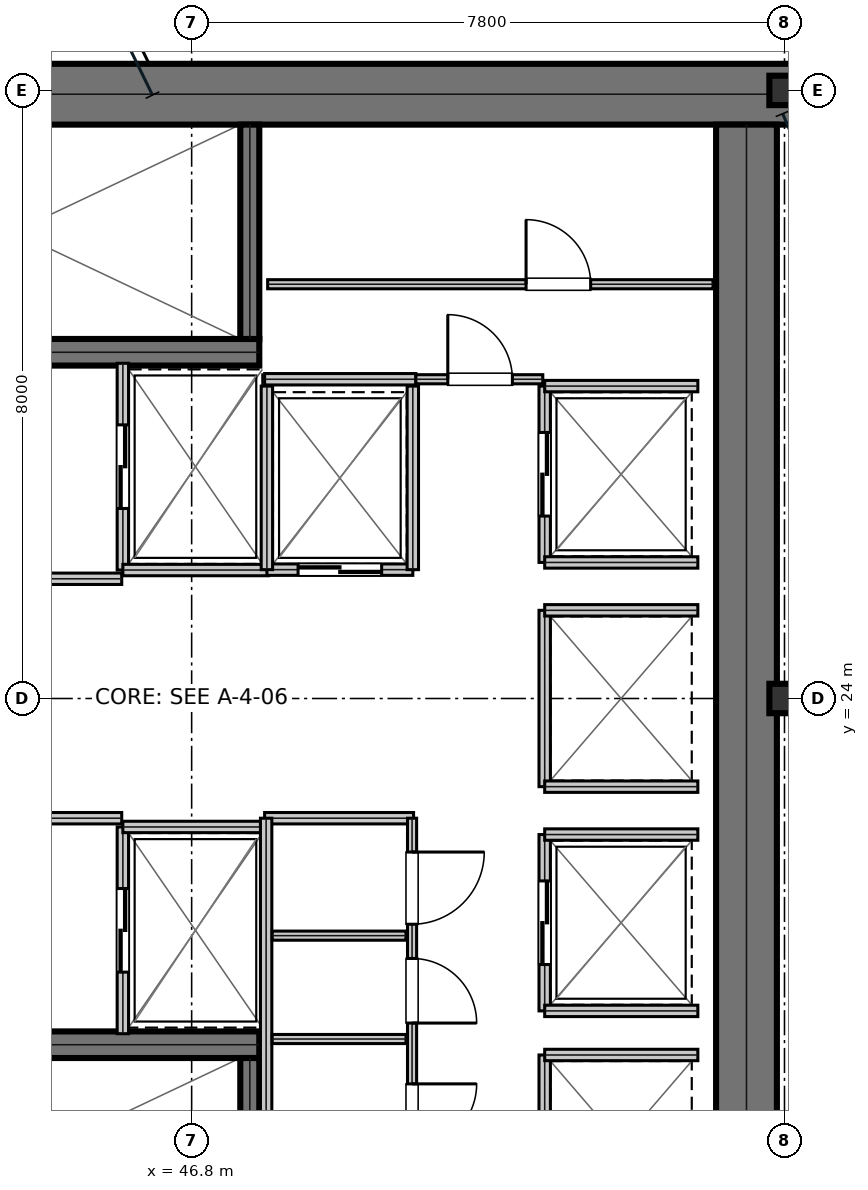
"""IFC4 building model, lengths in metres.
Left out: names, types, materials, properties, quantities, classifications, styles, units other than length and angle.
Written with IfcOpenShell. Run it as: python <this file> out.ifc"""

import sys

from ifc_helpers import new_model, si_unit, direction, frame, frame_2d, origin, origin_2d, place, context, subcontext, project, spatial, rectangle, i_section, extrude, element, fill, save


model = new_model("IFC4")
c1 = context("Model", 3, precision=1e-05, world=origin(), true_north=direction((0.0, 1.0)))
c2 = subcontext(c1, "Body", "Model", "MODEL_VIEW")
j1 = project(units=[si_unit("LENGTHUNIT", "METRE"), si_unit("PLANEANGLEUNIT", "RADIAN")], contexts=[c1])
p1 = place(None, origin())
s1 = spatial("IfcSite", under=j1, at=p1, CompositionType="ELEMENT")
p2 = place(p1, origin())
s2 = spatial("IfcBuilding", under=s1, at=p2, CompositionType="ELEMENT")
p3 = place(p2, frame((0.0, 0.0, 116.85)))
s3 = spatial("IfcBuildingStorey", under=s2, at=p3, CompositionType="ELEMENT", Elevation=116.85)
p4 = place(p3, frame((38.8, 31.95, 0.0), z_axis=(0.0, 0.0, 1.0), x_axis=(1.0, 0.0, 0.0)))
e1 = element("IfcWall", 1, at=p4, inside=s3, PredefinedType="SHEAR", context=c2, shape_type="SweptSolid", body=[
    extrude(rectangle(XDim=16.0, YDim=0.8, at=frame_2d((8.0, 0.0))), origin(), (0.0, 0.0, 1.0), 3.81),
])
p5 = place(p3, frame((54.1, 16.45, 0.0), z_axis=(0.0, 0.0, 1.0), x_axis=(0.0, 1.0, 0.0)))
e2 = element("IfcWall", 2, at=p5, inside=s3, PredefinedType="SHEAR", context=c2, shape_type="SweptSolid", body=[
    extrude(rectangle(XDim=15.1, YDim=0.8, at=frame_2d((7.55, 0.0))), origin(), (0.0, 0.0, 1.0), 3.81),
])
p6 = place(p3, frame((39.98, 28.555, 0.0), z_axis=(0.0, 0.0, 1.0), x_axis=(1.0, 0.0, 0.0)))
e3 = element("IfcWall", 3, at=p6, inside=s3, PredefinedType="SHEAR", context=c2, shape_type="SweptSolid", body=[
    extrude(rectangle(XDim=7.71, YDim=0.35, at=frame_2d((3.855, 0.0))), origin(), (0.0, 0.0, 1.0), 3.81),
])
p7 = place(p6, frame((0.25, 0.0, 0.0)))
e4 = element("IfcOpeningElement", 4, at=p7, cuts=e3, PredefinedType="OPENING", context=c2, shape_type="SweptSolid", body=[
    extrude(rectangle(XDim=1.1, YDim=2.15, at=frame_2d((0.55, 1.075))), frame((0.0, 0.185, 0.0), z_axis=(0.0, -1.0, 0.0), x_axis=(1.0, 0.0, 0.0)), (0.0, 0.0, 1.0), 0.37),
])
p8 = place(p3, frame((39.98, 19.445, 0.0), z_axis=(0.0, 0.0, 1.0), x_axis=(1.0, 0.0, 0.0)))
e5 = element("IfcWall", 5, at=p8, inside=s3, PredefinedType="SHEAR", context=c2, shape_type="SweptSolid", body=[
    extrude(rectangle(XDim=7.71, YDim=0.35, at=frame_2d((3.855, 0.0))), origin(), (0.0, 0.0, 1.0), 3.81),
])
p9 = place(p8, frame((0.25, 0.0, 0.0)))
e6 = element("IfcOpeningElement", 6, at=p9, cuts=e5, PredefinedType="OPENING", context=c2, shape_type="SweptSolid", body=[
    extrude(rectangle(XDim=1.1, YDim=2.15, at=frame_2d((0.55, 1.075))), frame((0.0, 0.185, 0.0), z_axis=(0.0, -1.0, 0.0), x_axis=(1.0, 0.0, 0.0)), (0.0, 0.0, 1.0), 0.37),
])
for number, where, z_axis, x_axis in (
    (7, (47.565, 28.73, 0.0), (0.0, 0.0, 1.0), (0.0, 1.0, 0.0)),
    (8, (47.565, 16.45, 0.0), (0.0, 0.0, 1.0), (0.0, 1.0, 0.0)),
):
    element("IfcWall", number, at=place(p3, frame(where, z_axis=z_axis, x_axis=x_axis)), inside=s3, PredefinedType="SHEAR", context=c2, shape_type="SweptSolid", body=[
        extrude(rectangle(XDim=2.82, YDim=0.25, at=frame_2d((1.41, 0.0))), origin(), (0.0, 0.0, 1.0), 3.81),
    ])
for number, where, z_axis, x_axis in (
    (9, (54.6, 24.0, 0.0), (0.0, 0.0, 1.0), (1.0, 0.0, 0.0)),
    (10, (54.6, 32.0, 0.0), (0.0, 0.0, 1.0), (1.0, 0.0, 0.0)),
):
    element("IfcColumn", number, at=place(p3, frame(where, z_axis=z_axis, x_axis=x_axis)), inside=s3, PredefinedType="COLUMN", context=c2, shape_type="SweptSolid", body=[
        extrude(i_section(OverallWidth=0.398, OverallDepth=0.387, WebThickness=0.021, FlangeThickness=0.033, at=origin_2d()), origin(), (0.0, 0.0, 1.0), 4.044),
    ])
p10 = place(p3, frame((39.98, 25.575, 0.0), z_axis=(0.0, 0.0, 1.0), x_axis=(1.0, 0.0, 0.0)))
e11 = element("IfcWall", 11, at=p10, inside=s3, PredefinedType="PARTITIONING", context=c2, shape_type="SweptSolid", body=[
    extrude(rectangle(XDim=5.9, YDim=0.15, at=frame_2d((2.95, 0.0))), origin(), (0.0, 0.0, 1.0), 3.81),
])
p11 = place(p10, frame((2.35, 0.0, 0.0)))
e12 = element("IfcOpeningElement", 12, at=p11, cuts=e11, PredefinedType="OPENING", context=c2, shape_type="SweptSolid", body=[
    extrude(rectangle(XDim=1.05, YDim=2.15, at=frame_2d((0.525, 1.075))), frame((0.0, 0.085, 0.0), z_axis=(0.0, -1.0, 0.0), x_axis=(1.0, 0.0, 0.0)), (0.0, 0.0, 1.0), 0.17),
])
p12 = place(p3, frame((39.98, 22.425, 0.0), z_axis=(0.0, 0.0, 1.0), x_axis=(1.0, 0.0, 0.0)))
e13 = element("IfcWall", 13, at=p12, inside=s3, PredefinedType="PARTITIONING", context=c2, shape_type="SweptSolid", body=[
    extrude(rectangle(XDim=5.9, YDim=0.15, at=frame_2d((2.95, 0.0))), origin(), (0.0, 0.0, 1.0), 3.81),
])
p13 = place(p12, frame((2.35, 0.0, 0.0)))
e14 = element("IfcOpeningElement", 14, at=p13, cuts=e13, PredefinedType="OPENING", context=c2, shape_type="SweptSolid", body=[
    extrude(rectangle(XDim=1.05, YDim=2.15, at=frame_2d((0.525, 1.075))), frame((0.0, 0.085, 0.0), z_axis=(0.0, -1.0, 0.0), x_axis=(1.0, 0.0, 0.0)), (0.0, 0.0, 1.0), 0.17),
])
p14 = place(p3, frame((45.895, 25.69, 0.0), z_axis=(0.0, 0.0, 1.0), x_axis=(0.0, 1.0, 0.0)))
e15 = element("IfcWall", 15, at=p14, inside=s3, PredefinedType="PARTITIONING", context=c2, shape_type="SweptSolid", body=[
    extrude(rectangle(XDim=2.72, YDim=0.15, at=frame_2d((1.36, 0.0))), origin(), (0.0, 0.0, 1.0), 3.81),
])
p15 = place(p14, frame((0.81, 0.0, 0.0)))
e16 = element("IfcOpeningElement", 16, at=p15, cuts=e15, PredefinedType="OPENING", context=c2, shape_type="SweptSolid", body=[
    extrude(rectangle(XDim=1.1, YDim=2.15, at=frame_2d((0.55, 1.075))), frame((0.0, 0.085, 0.0), z_axis=(0.0, -1.0, 0.0), x_axis=(1.0, 0.0, 0.0)), (0.0, 0.0, 1.0), 0.17),
])
p16 = place(p3, frame((45.895, 25.69, 0.0), z_axis=(0.0, 0.0, 1.0), x_axis=(1.0, 0.0, 0.0)))
e17 = element("IfcWall", 17, at=p16, inside=s3, PredefinedType="PARTITIONING", context=c2, shape_type="SweptSolid", body=[
    extrude(rectangle(XDim=1.915, YDim=0.15, at=frame_2d((0.958, 0.0))), origin(), (0.0, 0.0, 1.0), 3.81),
])
p17 = place(p3, frame((45.895, 19.59, 0.0), z_axis=(0.0, 0.0, 1.0), x_axis=(0.0, 1.0, 0.0)))
e18 = element("IfcWall", 18, at=p17, inside=s3, PredefinedType="PARTITIONING", context=c2, shape_type="SweptSolid", body=[
    extrude(rectangle(XDim=2.72, YDim=0.15, at=frame_2d((1.36, 0.0))), origin(), (0.0, 0.0, 1.0), 3.81),
])
p18 = place(p17, frame((0.81, 0.0, 0.0)))
e19 = element("IfcOpeningElement", 19, at=p18, cuts=e18, PredefinedType="OPENING", context=c2, shape_type="SweptSolid", body=[
    extrude(rectangle(XDim=1.1, YDim=2.15, at=frame_2d((0.55, 1.075))), frame((0.0, 0.085, 0.0), z_axis=(0.0, -1.0, 0.0), x_axis=(1.0, 0.0, 0.0)), (0.0, 0.0, 1.0), 0.17),
])
p19 = place(p3, frame((45.895, 22.31, 0.0), z_axis=(0.0, 0.0, 1.0), x_axis=(1.0, 0.0, 0.0)))
e20 = element("IfcWall", 20, at=p19, inside=s3, PredefinedType="PARTITIONING", context=c2, shape_type="SweptSolid", body=[
    extrude(rectangle(XDim=1.915, YDim=0.15, at=frame_2d((0.958, 0.0))), origin(), (0.0, 0.0, 1.0), 3.81),
])
p20 = place(p3, frame((47.79, 25.695, 0.0), z_axis=(0.0, 0.0, 1.0), x_axis=(1.0, 0.0, 0.0)))
e21 = element("IfcWall", 21, at=p20, inside=s3, PredefinedType="PARTITIONING", context=c2, shape_type="SweptSolid", body=[
    extrude(rectangle(XDim=1.92, YDim=0.15, at=frame_2d((0.96, 0.0))), origin(), (0.0, 0.0, 1.0), 3.81),
])
p21 = place(p20, frame((0.41, 0.0, 0.0)))
e22 = element("IfcOpeningElement", 22, at=p21, cuts=e21, PredefinedType="OPENING", context=c2, shape_type="SweptSolid", body=[
    extrude(rectangle(XDim=1.1, YDim=2.15, at=frame_2d((0.55, 1.075))), frame((0.0, 0.085, 0.0), z_axis=(0.0, -1.0, 0.0), x_axis=(1.0, 0.0, 0.0)), (0.0, 0.0, 1.0), 0.17),
])
for number, where, z_axis, x_axis in (
    (23, (47.79, 25.695, 0.0), (0.0, 0.0, 1.0), (0.0, 1.0, 0.0)),
    (24, (49.71, 25.695, 0.0), (0.0, 0.0, 1.0), (0.0, 1.0, 0.0)),
):
    element("IfcWall", number, at=place(p3, frame(where, z_axis=z_axis, x_axis=x_axis)), inside=s3, PredefinedType="PARTITIONING", context=c2, shape_type="SweptSolid", body=[
        extrude(rectangle(XDim=2.415, YDim=0.15, at=frame_2d((1.208, 0.0))), origin(), (0.0, 0.0, 1.0), 3.81),
    ])
p22 = place(p3, frame((51.445, 25.79, 0.0), z_axis=(0.0, 0.0, 1.0), x_axis=(0.0, 1.0, 0.0)))
e25 = element("IfcWall", 25, at=p22, inside=s3, PredefinedType="PARTITIONING", context=c2, shape_type="SweptSolid", body=[
    extrude(rectangle(XDim=2.32, YDim=0.15, at=frame_2d((1.16, 0.0))), origin(), (0.0, 0.0, 1.0), 3.81),
])
p23 = place(p22, frame((0.61, 0.0, 0.0)))
e26 = element("IfcOpeningElement", 26, at=p23, cuts=e25, PredefinedType="OPENING", context=c2, shape_type="SweptSolid", body=[
    extrude(rectangle(XDim=1.1, YDim=2.15, at=frame_2d((0.55, 1.075))), frame((0.0, 0.085, 0.0), z_axis=(0.0, -1.0, 0.0), x_axis=(1.0, 0.0, 0.0)), (0.0, 0.0, 1.0), 0.17),
])
for number, where, z_axis, x_axis in (
    (27, (51.445, 25.79, 0.0), (0.0, 0.0, 1.0), (1.0, 0.0, 0.0)),
    (28, (51.445, 28.11, 0.0), (0.0, 0.0, 1.0), (1.0, 0.0, 0.0)),
):
    element("IfcWall", number, at=place(p3, frame(where, z_axis=z_axis, x_axis=x_axis)), inside=s3, PredefinedType="PARTITIONING", context=c2, shape_type="SweptSolid", body=[
        extrude(rectangle(XDim=2.015, YDim=0.15, at=frame_2d((1.007, 0.0))), origin(), (0.0, 0.0, 1.0), 3.81),
    ])
p24 = place(p3, frame((51.445, 19.89, 0.0), z_axis=(0.0, 0.0, 1.0), x_axis=(0.0, 1.0, 0.0)))
e29 = element("IfcWall", 29, at=p24, inside=s3, PredefinedType="PARTITIONING", context=c2, shape_type="SweptSolid", body=[
    extrude(rectangle(XDim=2.32, YDim=0.15, at=frame_2d((1.16, 0.0))), origin(), (0.0, 0.0, 1.0), 3.81),
])
p25 = place(p24, frame((0.61, 0.0, 0.0)))
e30 = element("IfcOpeningElement", 30, at=p25, cuts=e29, PredefinedType="OPENING", context=c2, shape_type="SweptSolid", body=[
    extrude(rectangle(XDim=1.1, YDim=2.15, at=frame_2d((0.55, 1.075))), frame((0.0, 0.085, 0.0), z_axis=(0.0, -1.0, 0.0), x_axis=(1.0, 0.0, 0.0)), (0.0, 0.0, 1.0), 0.17),
])
for number, where, z_axis, x_axis in (
    (31, (51.445, 19.89, 0.0), (0.0, 0.0, 1.0), (1.0, 0.0, 0.0)),
    (32, (51.445, 22.21, 0.0), (0.0, 0.0, 1.0), (1.0, 0.0, 0.0)),
):
    element("IfcWall", number, at=place(p3, frame(where, z_axis=z_axis, x_axis=x_axis)), inside=s3, PredefinedType="PARTITIONING", context=c2, shape_type="SweptSolid", body=[
        extrude(rectangle(XDim=2.015, YDim=0.15, at=frame_2d((1.007, 0.0))), origin(), (0.0, 0.0, 1.0), 3.81),
    ])
p26 = place(p3, frame((51.445, 22.84, 0.0), z_axis=(0.0, 0.0, 1.0), x_axis=(0.0, 1.0, 0.0)))
e33 = element("IfcWall", 33, at=p26, inside=s3, PredefinedType="PARTITIONING", context=c2, shape_type="SweptSolid", body=[
    extrude(rectangle(XDim=2.32, YDim=0.15, at=frame_2d((1.16, 0.0))), origin(), (0.0, 0.0, 1.0), 3.81),
])
for number, where, z_axis, x_axis in (
    (34, (51.445, 22.84, 0.0), (0.0, 0.0, 1.0), (1.0, 0.0, 0.0)),
    (35, (51.445, 25.16, 0.0), (0.0, 0.0, 1.0), (1.0, 0.0, 0.0)),
):
    element("IfcWall", number, at=place(p3, frame(where, z_axis=z_axis, x_axis=x_axis)), inside=s3, PredefinedType="PARTITIONING", context=c2, shape_type="SweptSolid", body=[
        extrude(rectangle(XDim=2.015, YDim=0.15, at=frame_2d((1.007, 0.0))), origin(), (0.0, 0.0, 1.0), 3.81),
    ])
p27 = place(p3, frame((51.445, 16.99, 0.0), z_axis=(0.0, 0.0, 1.0), x_axis=(0.0, 1.0, 0.0)))
e36 = element("IfcWall", 36, at=p27, inside=s3, PredefinedType="PARTITIONING", context=c2, shape_type="SweptSolid", body=[
    extrude(rectangle(XDim=2.32, YDim=0.15, at=frame_2d((1.16, 0.0))), origin(), (0.0, 0.0, 1.0), 3.81),
])
p28 = place(p3, frame((51.445, 19.31, 0.0), z_axis=(0.0, 0.0, 1.0), x_axis=(1.0, 0.0, 0.0)))
e37 = element("IfcWall", 37, at=p28, inside=s3, PredefinedType="PARTITIONING", context=c2, shape_type="SweptSolid", body=[
    extrude(rectangle(XDim=2.015, YDim=0.15, at=frame_2d((1.007, 0.0))), origin(), (0.0, 0.0, 1.0), 3.81),
])
p29 = place(p3, frame((47.76, 22.425, 0.0), z_axis=(0.0, 0.0, 1.0), x_axis=(1.0, 0.0, 0.0)))
e38 = element("IfcWall", 38, at=p29, inside=s3, PredefinedType="PARTITIONING", context=c2, shape_type="SweptSolid", body=[
    extrude(rectangle(XDim=1.96, YDim=0.15, at=frame_2d((0.98, 0.0))), origin(), (0.0, 0.0, 1.0), 3.81),
])
p30 = place(p3, frame((47.78, 16.45, 0.0), z_axis=(0.0, 0.0, 1.0), x_axis=(0.0, 1.0, 0.0)))
e39 = element("IfcWall", 39, at=p30, inside=s3, PredefinedType="PARTITIONING", context=c2, shape_type="SweptSolid", body=[
    extrude(rectangle(XDim=5.975, YDim=0.15, at=frame_2d((2.988, 0.0))), origin(), (0.0, 0.0, 1.0), 3.81),
])
for number, where, z_axis, x_axis in (
    (40, (47.86, 19.52, 0.0), (0.0, 0.0, 1.0), (1.0, 0.0, 0.0)),
    (41, (47.86, 20.88, 0.0), (0.0, 0.0, 1.0), (1.0, 0.0, 0.0)),
):
    element("IfcWall", number, at=place(p3, frame(where, z_axis=z_axis, x_axis=x_axis)), inside=s3, PredefinedType="PARTITIONING", context=c2, shape_type="SweptSolid", body=[
        extrude(rectangle(XDim=1.76, YDim=0.12, at=frame_2d((0.88, 0.0))), origin(), (0.0, 0.0, 1.0), 3.81),
    ])
p31 = place(p3, frame((49.7, 16.48, 0.0), z_axis=(0.0, 0.0, 1.0), x_axis=(0.0, 1.0, 0.0)))
e42 = element("IfcWall", 42, at=p31, inside=s3, PredefinedType="PARTITIONING", context=c2, shape_type="SweptSolid", body=[
    extrude(rectangle(XDim=5.945, YDim=0.12, at=frame_2d((2.973, 0.0))), origin(), (0.0, 0.0, 1.0), 3.81),
])
p32 = place(p31, frame((1.6, 0.0, 0.0)))
e43 = element("IfcOpeningElement", 43, at=p32, cuts=e42, PredefinedType="OPENING", context=c2, shape_type="SweptSolid", body=[
    extrude(rectangle(XDim=0.85, YDim=2.15, at=frame_2d((0.425, 1.075))), frame((0.0, 0.07, 0.0), z_axis=(0.0, -1.0, 0.0), x_axis=(1.0, 0.0, 0.0)), (0.0, 0.0, 1.0), 0.14),
])
p33 = place(p31, frame((3.25, 0.0, 0.0)))
e44 = element("IfcOpeningElement", 44, at=p33, cuts=e42, PredefinedType="OPENING", context=c2, shape_type="SweptSolid", body=[
    extrude(rectangle(XDim=0.85, YDim=2.15, at=frame_2d((0.425, 1.075))), frame((0.0, 0.07, 0.0), z_axis=(0.0, -1.0, 0.0), x_axis=(1.0, 0.0, 0.0)), (0.0, 0.0, 1.0), 0.14),
])
p34 = place(p31, frame((4.55, 0.0, 0.0)))
e45 = element("IfcOpeningElement", 45, at=p34, cuts=e42, PredefinedType="OPENING", context=c2, shape_type="SweptSolid", body=[
    extrude(rectangle(XDim=0.95, YDim=2.15, at=frame_2d((0.475, 1.075))), frame((0.0, 0.07, 0.0), z_axis=(0.0, -1.0, 0.0), x_axis=(1.0, 0.0, 0.0)), (0.0, 0.0, 1.0), 0.14),
])
p35 = place(p3, frame((47.76, 28.2, 0.0), z_axis=(0.0, 0.0, 1.0), x_axis=(1.0, 0.0, 0.0)))
e46 = element("IfcWall", 46, at=p35, inside=s3, PredefinedType="PARTITIONING", context=c2, shape_type="SweptSolid", body=[
    extrude(rectangle(XDim=1.99, YDim=0.15, at=frame_2d((0.995, 0.0))), origin(), (0.0, 0.0, 1.0), 3.81),
])
p36 = place(p3, frame((49.75, 28.2, 0.0), z_axis=(0.0, 0.0, 1.0), x_axis=(1.0, 0.0, 0.0)))
e47 = element("IfcWall", 47, at=p36, inside=s3, PredefinedType="PARTITIONING", context=c2, shape_type="SweptSolid", body=[
    extrude(rectangle(XDim=1.67, YDim=0.12, at=frame_2d((0.835, 0.0))), origin(), (0.0, 0.0, 1.0), 3.81),
])
p37 = place(p36, frame((0.42, 0.0, 0.0)))
e48 = element("IfcOpeningElement", 48, at=p37, cuts=e47, PredefinedType="OPENING", context=c2, shape_type="SweptSolid", body=[
    extrude(rectangle(XDim=0.85, YDim=2.15, at=frame_2d((0.425, 1.075))), frame((0.0, 0.07, 0.0), z_axis=(0.0, -1.0, 0.0), x_axis=(1.0, 0.0, 0.0)), (0.0, 0.0, 1.0), 0.14),
])
p38 = place(p3, frame((47.8, 29.45, 0.0), z_axis=(0.0, 0.0, 1.0), x_axis=(1.0, 0.0, 0.0)))
e49 = element("IfcWall", 49, at=p38, inside=s3, PredefinedType="PARTITIONING", context=c2, shape_type="SweptSolid", body=[
    extrude(rectangle(XDim=5.86, YDim=0.12, at=frame_2d((2.93, 0.0))), origin(), (0.0, 0.0, 1.0), 3.81),
])
p39 = place(p38, frame((3.4, 0.0, 0.0)))
e50 = element("IfcOpeningElement", 50, at=p39, cuts=e49, PredefinedType="OPENING", context=c2, shape_type="SweptSolid", body=[
    extrude(rectangle(XDim=0.85, YDim=2.15, at=frame_2d((0.425, 1.075))), frame((0.0, 0.07, 0.0), z_axis=(0.0, -1.0, 0.0), x_axis=(1.0, 0.0, 0.0)), (0.0, 0.0, 1.0), 0.14),
])
p40 = place(p15, frame((1.1, 0.0, 0.0), z_axis=(0.0, 0.0, 1.0), x_axis=(-1.0, 0.0, 0.0)))
e51 = element("IfcDoor", 51, at=p40, inside=s3, OperationType="DOUBLE_DOOR_SLIDING", PredefinedType="DOOR", context=c2, shape_type="SweptSolid", body=[
    extrude(rectangle(XDim=1.1, YDim=2.15, at=frame_2d((0.55, 1.075))), frame((0.0, 0.025, 0.0), z_axis=(0.0, -1.0, 0.0), x_axis=(1.0, 0.0, 0.0)), (0.0, 0.0, 1.0), 0.05),
])
fill(e16, e51)
p41 = place(p18, frame((1.1, 0.0, 0.0), z_axis=(0.0, 0.0, 1.0), x_axis=(-1.0, 0.0, 0.0)))
e52 = element("IfcDoor", 52, at=p41, inside=s3, OperationType="DOUBLE_DOOR_SLIDING", PredefinedType="DOOR", context=c2, shape_type="SweptSolid", body=[
    extrude(rectangle(XDim=1.1, YDim=2.15, at=frame_2d((0.55, 1.075))), frame((0.0, 0.025, 0.0), z_axis=(0.0, -1.0, 0.0), x_axis=(1.0, 0.0, 0.0)), (0.0, 0.0, 1.0), 0.05),
])
fill(e19, e52)
p42 = place(p21, frame((1.1, 0.0, 0.0), z_axis=(0.0, 0.0, 1.0), x_axis=(-1.0, 0.0, 0.0)))
e53 = element("IfcDoor", 53, at=p42, inside=s3, OperationType="DOUBLE_DOOR_SLIDING", PredefinedType="DOOR", context=c2, shape_type="SweptSolid", body=[
    extrude(rectangle(XDim=1.1, YDim=2.15, at=frame_2d((0.55, 1.075))), frame((0.0, 0.025, 0.0), z_axis=(0.0, -1.0, 0.0), x_axis=(1.0, 0.0, 0.0)), (0.0, 0.0, 1.0), 0.05),
])
fill(e22, e53)
p43 = place(p23, frame((1.1, 0.0, 0.0), z_axis=(0.0, 0.0, 1.0), x_axis=(-1.0, 0.0, 0.0)))
e54 = element("IfcDoor", 54, at=p43, inside=s3, OperationType="DOUBLE_DOOR_SLIDING", PredefinedType="DOOR", context=c2, shape_type="SweptSolid", body=[
    extrude(rectangle(XDim=1.1, YDim=2.15, at=frame_2d((0.55, 1.075))), frame((0.0, 0.025, 0.0), z_axis=(0.0, -1.0, 0.0), x_axis=(1.0, 0.0, 0.0)), (0.0, 0.0, 1.0), 0.05),
])
fill(e26, e54)
p44 = place(p25, frame((1.1, 0.0, 0.0), z_axis=(0.0, 0.0, 1.0), x_axis=(-1.0, 0.0, 0.0)))
e55 = element("IfcDoor", 55, at=p44, inside=s3, OperationType="DOUBLE_DOOR_SLIDING", PredefinedType="DOOR", context=c2, shape_type="SweptSolid", body=[
    extrude(rectangle(XDim=1.1, YDim=2.15, at=frame_2d((0.55, 1.075))), frame((0.0, 0.025, 0.0), z_axis=(0.0, -1.0, 0.0), x_axis=(1.0, 0.0, 0.0)), (0.0, 0.0, 1.0), 0.05),
])
fill(e30, e55)
p45 = place(p32, frame((0.85, 0.0, 0.0), z_axis=(0.0, 0.0, 1.0), x_axis=(-1.0, 0.0, 0.0)))
e56 = element("IfcDoor", 56, at=p45, inside=s3, OperationType="SINGLE_SWING_LEFT", PredefinedType="DOOR", context=c2, shape_type="SweptSolid", body=[
    extrude(rectangle(XDim=0.85, YDim=2.15, at=frame_2d((0.425, 1.075))), frame((0.0, 0.025, 0.0), z_axis=(0.0, -1.0, 0.0), x_axis=(1.0, 0.0, 0.0)), (0.0, 0.0, 1.0), 0.05),
])
fill(e43, e56)
p46 = place(p33, frame((0.85, 0.0, 0.0), z_axis=(0.0, 0.0, 1.0), x_axis=(-1.0, 0.0, 0.0)))
e57 = element("IfcDoor", 57, at=p46, inside=s3, OperationType="SINGLE_SWING_RIGHT", PredefinedType="DOOR", context=c2, shape_type="SweptSolid", body=[
    extrude(rectangle(XDim=0.85, YDim=2.15, at=frame_2d((0.425, 1.075))), frame((0.0, 0.025, 0.0), z_axis=(0.0, -1.0, 0.0), x_axis=(1.0, 0.0, 0.0)), (0.0, 0.0, 1.0), 0.05),
])
fill(e44, e57)
p47 = place(p34, frame((0.95, 0.0, 0.0), z_axis=(0.0, 0.0, 1.0), x_axis=(-1.0, 0.0, 0.0)))
e58 = element("IfcDoor", 58, at=p47, inside=s3, OperationType="SINGLE_SWING_LEFT", PredefinedType="DOOR", context=c2, shape_type="SweptSolid", body=[
    extrude(rectangle(XDim=0.95, YDim=2.15, at=frame_2d((0.475, 1.075))), frame((0.0, 0.025, 0.0), z_axis=(0.0, -1.0, 0.0), x_axis=(1.0, 0.0, 0.0)), (0.0, 0.0, 1.0), 0.05),
])
fill(e45, e58)
p48 = place(p37, origin())
e59 = element("IfcDoor", 59, at=p48, inside=s3, OperationType="SINGLE_SWING_LEFT", PredefinedType="DOOR", context=c2, shape_type="SweptSolid", body=[
    extrude(rectangle(XDim=0.85, YDim=2.15, at=frame_2d((0.425, 1.075))), frame((0.0, 0.025, 0.0), z_axis=(0.0, -1.0, 0.0), x_axis=(1.0, 0.0, 0.0)), (0.0, 0.0, 1.0), 0.05),
])
fill(e48, e59)
p49 = place(p39, origin())
e60 = element("IfcDoor", 60, at=p49, inside=s3, OperationType="SINGLE_SWING_LEFT", PredefinedType="DOOR", context=c2, shape_type="SweptSolid", body=[
    extrude(rectangle(XDim=0.85, YDim=2.15, at=frame_2d((0.425, 1.075))), frame((0.0, 0.025, 0.0), z_axis=(0.0, -1.0, 0.0), x_axis=(1.0, 0.0, 0.0)), (0.0, 0.0, 1.0), 0.05),
])
fill(e50, e60)
save(model, sys.argv[1])
